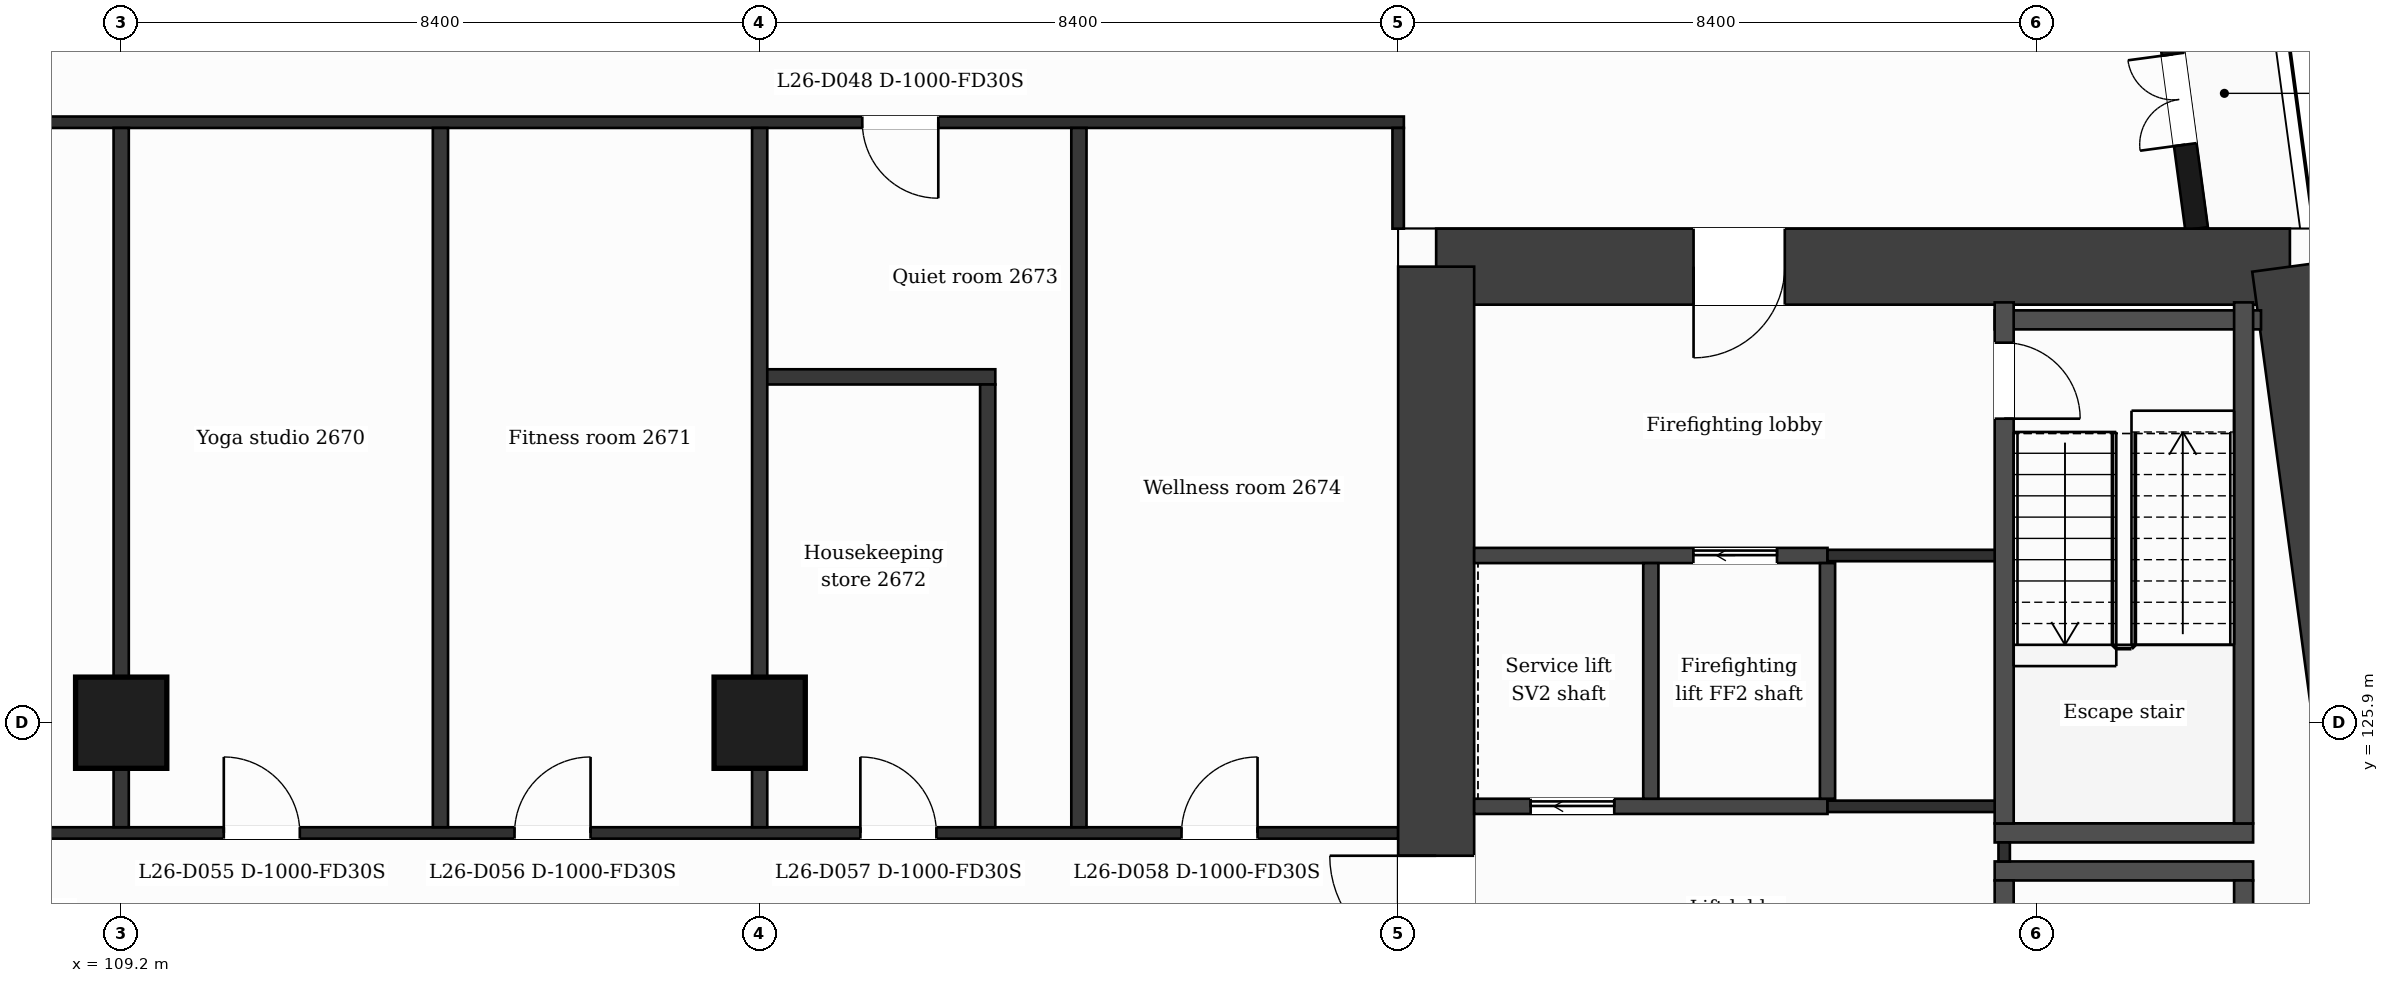
"""IFC4 building model, lengths in metres.
Left out: names, types, materials, properties, quantities, classifications, styles, units other than length and angle.
Written with IfcOpenShell. Run it as: python <this file> out.ifc"""

import sys

from ifc_helpers import new_model, si_unit, direction, frame, frame_2d, origin, origin_2d, place, context, subcontext, project, spatial, rectangle, extrude, element, fill, save


model = new_model("IFC4")
c1 = context("Model", 3, precision=1e-05, world=origin(), true_north=direction((0.0, 1.0)))
c2 = subcontext(c1, "Body", "Model", "MODEL_VIEW")
j1 = project(units=[si_unit("LENGTHUNIT", "METRE"), si_unit("PLANEANGLEUNIT", "RADIAN")], contexts=[c1])
p1 = place(None, origin())
s1 = spatial("IfcSite", under=j1, at=p1, CompositionType="ELEMENT")
p2 = place(p1, origin())
s2 = spatial("IfcBuilding", under=s1, at=p2, CompositionType="ELEMENT")
p3 = place(p2, frame((0.0, 0.0, 113.2)))
s3 = spatial("IfcBuildingStorey", under=s2, at=p3, CompositionType="ELEMENT", Elevation=113.2)
p4 = place(p3, frame((126.5, 131.9, 0.0), z_axis=(0.0, 0.0, 1.0), x_axis=(1.0, 0.0, 0.0)))
e1 = element("IfcWall", 1, at=p4, inside=s3, PredefinedType="SHEAR", context=c2, shape_type="SweptSolid", body=[
    extrude(rectangle(XDim=11.232, YDim=1.0, at=frame_2d((5.616, 0.0))), origin(), (0.0, 0.0, 1.0), 3.7),
])
p5 = place(p4, frame((3.386, 0.0, 0.0)))
e2 = element("IfcOpeningElement", 2, at=p5, cuts=e1, PredefinedType="OPENING", context=c2, shape_type="SweptSolid", body=[
    extrude(rectangle(XDim=1.2, YDim=2.1, at=frame_2d((0.6, 1.05))), frame((0.0, 0.51, 0.0), z_axis=(0.0, -1.0, 0.0), x_axis=(1.0, 0.0, 0.0)), (0.0, 0.0, 1.0), 1.02),
])
p6 = place(p3, frame((137.732, 131.9, 0.0), z_axis=(0.0, 0.0, 1.0), x_axis=(0.133411141623, -0.991060778808, 0.0)))
e3 = element("IfcWall", 3, at=p6, inside=s3, PredefinedType="SHEAR", context=c2, shape_type="SweptSolid", body=[
    extrude(rectangle(XDim=21.189, YDim=1.0, at=frame_2d((10.595, 0.0))), origin(), (0.0, 0.0, 1.0), 3.7),
])
p7 = place(p3, frame((126.5, 110.9, 0.0), z_axis=(0.0, 0.0, 1.0), x_axis=(0.0, 1.0, 0.0)))
e4 = element("IfcWall", 4, at=p7, inside=s3, PredefinedType="SHEAR", context=c2, shape_type="SweptSolid", body=[
    extrude(rectangle(XDim=21.0, YDim=1.0, at=frame_2d((10.5, 0.0))), origin(), (0.0, 0.0, 1.0), 3.7),
])
p8 = place(p7, frame((11.85, 0.0, 0.0)))
e5 = element("IfcOpeningElement", 5, at=p8, cuts=e4, PredefinedType="OPENING", context=c2, shape_type="SweptSolid", body=[
    extrude(rectangle(XDim=1.4, YDim=2.1, at=frame_2d((0.7, 1.05))), frame((0.0, 0.51, 0.0), z_axis=(0.0, -1.0, 0.0), x_axis=(1.0, 0.0, 0.0)), (0.0, 0.0, 1.0), 1.02),
])
for number, where, z_axis, x_axis in (
    (6, (109.2, 125.9, 0.0), (0.0, 0.0, 1.0), (1.0, 0.0, 0.0)),
    (7, (117.6, 125.9, 0.0), (0.0, 0.0, 1.0), (1.0, 0.0, 0.0)),
):
    element("IfcColumn", number, at=place(p3, frame(where, z_axis=z_axis, x_axis=x_axis)), inside=s3, PredefinedType="COLUMN", context=c2, shape_type="SweptSolid", body=[
        extrude(rectangle(XDim=1.2, YDim=1.2, at=origin_2d()), origin(), (0.0, 0.0, 1.0), 3.7),
    ])
p9 = place(p3, frame((136.504, 132.4, 0.0), z_axis=(0.0, 0.0, 1.0), x_axis=(-0.133399697462, 0.99106231929, 0.0)))
e8 = element("IfcWall", 8, at=p9, inside=s3, PredefinedType="SOLIDWALL", context=c2, shape_type="SweptSolid", body=[
    extrude(rectangle(XDim=6.74, YDim=0.3, at=frame_2d((3.37, 0.0))), origin(), (0.0, 0.0, 1.0), 3.38),
])
p10 = place(p9, frame((1.115, 0.0, 0.0)))
e9 = element("IfcOpeningElement", 9, at=p10, cuts=e8, PredefinedType="OPENING", context=c2, shape_type="SweptSolid", body=[
    extrude(rectangle(XDim=1.2, YDim=2.4, at=frame_2d((0.6, 1.2))), frame((0.0, 0.16, 0.0), z_axis=(0.0, -1.0, 0.0), x_axis=(1.0, 0.0, 0.0)), (0.0, 0.0, 1.0), 0.32),
])
p11 = place(p9, frame((3.835, 0.0, 0.9)))
e10 = element("IfcOpeningElement", 10, at=p11, cuts=e8, PredefinedType="OPENING", context=c2, shape_type="SweptSolid", body=[
    extrude(rectangle(XDim=2.4, YDim=2.1, at=frame_2d((1.2, 1.05))), frame((0.0, 0.16, 0.0), z_axis=(0.0, -1.0, 0.0), x_axis=(1.0, 0.0, 0.0)), (0.0, 0.0, 1.0), 0.32),
])
for number, where, z_axis, x_axis in (
    (11, (133.848, 123.95, 0.0), (0.0, 0.0, 1.0), (1.0, 0.0, 0.0)),
    (12, (133.848, 124.45, 0.0), (0.0, 0.0, 1.0), (1.0, 0.0, 0.0)),
):
    element("IfcWall", number, at=place(p3, frame(where, z_axis=z_axis, x_axis=x_axis)), inside=s3, PredefinedType="PARTITIONING", context=c2, shape_type="SweptSolid", body=[
        extrude(rectangle(XDim=3.4, YDim=0.25, at=frame_2d((1.7, 0.0))), origin(), (0.0, 0.0, 1.0), 3.38),
    ])
p12 = place(p3, frame((100.8, 124.45, 0.0), z_axis=(0.0, 0.0, 1.0), x_axis=(1.0, 0.0, 0.0)))
e13 = element("IfcWall", 13, at=p12, inside=s3, PredefinedType="PARTITIONING", context=c2, shape_type="SweptSolid", body=[
    extrude(rectangle(XDim=25.2, YDim=0.15, at=frame_2d((12.6, 0.0))), origin(), (0.0, 0.0, 1.0), 3.38),
])
p13 = place(p12, frame((3.7, 0.0, 0.0)))
e14 = element("IfcOpeningElement", 14, at=p13, cuts=e13, PredefinedType="OPENING", context=c2, shape_type="SweptSolid", body=[
    extrude(rectangle(XDim=1.0, YDim=2.1, at=frame_2d((0.5, 1.05))), frame((0.0, 0.085, 0.0), z_axis=(0.0, -1.0, 0.0), x_axis=(1.0, 0.0, 0.0)), (0.0, 0.0, 1.0), 0.17),
])
p14 = place(p12, frame((9.75, 0.0, 0.0)))
e15 = element("IfcOpeningElement", 15, at=p14, cuts=e13, PredefinedType="OPENING", context=c2, shape_type="SweptSolid", body=[
    extrude(rectangle(XDim=1.0, YDim=2.1, at=frame_2d((0.5, 1.05))), frame((0.0, 0.085, 0.0), z_axis=(0.0, -1.0, 0.0), x_axis=(1.0, 0.0, 0.0)), (0.0, 0.0, 1.0), 0.17),
])
p15 = place(p12, frame((13.575, 0.0, 0.0)))
e16 = element("IfcOpeningElement", 16, at=p15, cuts=e13, PredefinedType="OPENING", context=c2, shape_type="SweptSolid", body=[
    extrude(rectangle(XDim=1.0, YDim=2.1, at=frame_2d((0.5, 1.05))), frame((0.0, 0.085, 0.0), z_axis=(0.0, -1.0, 0.0), x_axis=(1.0, 0.0, 0.0)), (0.0, 0.0, 1.0), 0.17),
])
p16 = place(p12, frame((18.125, 0.0, 0.0)))
e17 = element("IfcOpeningElement", 17, at=p16, cuts=e13, PredefinedType="OPENING", context=c2, shape_type="SweptSolid", body=[
    extrude(rectangle(XDim=1.0, YDim=2.1, at=frame_2d((0.5, 1.05))), frame((0.0, 0.085, 0.0), z_axis=(0.0, -1.0, 0.0), x_axis=(1.0, 0.0, 0.0)), (0.0, 0.0, 1.0), 0.17),
])
p17 = place(p12, frame((22.35, 0.0, 0.0)))
e18 = element("IfcOpeningElement", 18, at=p17, cuts=e13, PredefinedType="OPENING", context=c2, shape_type="SweptSolid", body=[
    extrude(rectangle(XDim=1.0, YDim=2.1, at=frame_2d((0.5, 1.05))), frame((0.0, 0.085, 0.0), z_axis=(0.0, -1.0, 0.0), x_axis=(1.0, 0.0, 0.0)), (0.0, 0.0, 1.0), 0.17),
])
p18 = place(p3, frame((127.0, 124.8, 0.0), z_axis=(0.0, 0.0, 1.0), x_axis=(1.0, 0.0, 0.0)))
e19 = element("IfcWall", 19, at=p18, inside=s3, PredefinedType="PARTITIONING", context=c2, shape_type="SweptSolid", body=[
    extrude(rectangle(XDim=4.649, YDim=0.2, at=frame_2d((2.324, 0.0))), origin(), (0.0, 0.0, 1.0), 3.38),
])
p19 = place(p18, frame((0.743, 0.0, 0.0)))
e20 = element("IfcOpeningElement", 20, at=p19, cuts=e19, PredefinedType="OPENING", context=c2, shape_type="SweptSolid", body=[
    extrude(rectangle(XDim=1.1, YDim=2.1, at=frame_2d((0.55, 1.05))), frame((0.0, 0.11, 0.0), z_axis=(0.0, -1.0, 0.0), x_axis=(1.0, 0.0, 0.0)), (0.0, 0.0, 1.0), 0.22),
])
p20 = place(p3, frame((131.649, 124.8, 0.0), z_axis=(0.0, 0.0, 1.0), x_axis=(1.0, 0.0, 0.0)))
e21 = element("IfcWall", 21, at=p20, inside=s3, PredefinedType="PARTITIONING", context=c2, shape_type="SweptSolid", body=[
    extrude(rectangle(XDim=2.449, YDim=0.15, at=frame_2d((1.225, 0.0))), origin(), (0.0, 0.0, 1.0), 3.38),
])
p21 = place(p3, frame((127.0, 128.1, 0.0), z_axis=(0.0, 0.0, 1.0), x_axis=(1.0, 0.0, 0.0)))
e22 = element("IfcWall", 22, at=p21, inside=s3, PredefinedType="PARTITIONING", context=c2, shape_type="SweptSolid", body=[
    extrude(rectangle(XDim=4.649, YDim=0.2, at=frame_2d((2.324, 0.0))), origin(), (0.0, 0.0, 1.0), 3.38),
])
p22 = place(p21, frame((2.884, 0.0, 0.0)))
e23 = element("IfcOpeningElement", 23, at=p22, cuts=e22, PredefinedType="OPENING", context=c2, shape_type="SweptSolid", body=[
    extrude(rectangle(XDim=1.1, YDim=2.1, at=frame_2d((0.55, 1.05))), frame((0.0, 0.11, 0.0), z_axis=(0.0, -1.0, 0.0), x_axis=(1.0, 0.0, 0.0)), (0.0, 0.0, 1.0), 0.22),
])
p23 = place(p3, frame((131.649, 128.1, 0.0), z_axis=(0.0, 0.0, 1.0), x_axis=(1.0, 0.0, 0.0)))
e24 = element("IfcWall", 24, at=p23, inside=s3, PredefinedType="PARTITIONING", context=c2, shape_type="SweptSolid", body=[
    extrude(rectangle(XDim=2.324, YDim=0.15, at=frame_2d((1.162, 0.0))), origin(), (0.0, 0.0, 1.0), 3.38),
])
p24 = place(p3, frame((117.6, 130.45, 0.0), z_axis=(0.0, 0.0, 1.0), x_axis=(1.0, 0.0, 0.0)))
e25 = element("IfcWall", 25, at=p24, inside=s3, PredefinedType="PARTITIONING", context=c2, shape_type="SweptSolid", body=[
    extrude(rectangle(XDim=3.1, YDim=0.2, at=frame_2d((1.55, 0.0))), origin(), (0.0, 0.0, 1.0), 3.38),
])
p25 = place(p3, frame((133.848, 131.2, 0.0), z_axis=(0.0, 0.0, 1.0), x_axis=(1.0, 0.0, 0.0)))
e26 = element("IfcWall", 26, at=p25, inside=s3, PredefinedType="PARTITIONING", context=c2, shape_type="SweptSolid", body=[
    extrude(rectangle(XDim=3.504, YDim=0.25, at=frame_2d((1.752, 0.0))), origin(), (0.0, 0.0, 1.0), 3.38),
])
p26 = place(p3, frame((100.725, 133.8, 0.0), z_axis=(0.0, 0.0, 1.0), x_axis=(1.0, 0.0, 0.0)))
e27 = element("IfcWall", 27, at=p26, inside=s3, PredefinedType="PARTITIONING", context=c2, shape_type="SweptSolid", body=[
    extrude(rectangle(XDim=25.35, YDim=0.15, at=frame_2d((12.675, 0.0))), origin(), (0.0, 0.0, 1.0), 3.38),
])
p27 = place(p26, frame((18.225, 0.0, 0.0)))
e28 = element("IfcOpeningElement", 28, at=p27, cuts=e27, PredefinedType="OPENING", context=c2, shape_type="SweptSolid", body=[
    extrude(rectangle(XDim=1.0, YDim=2.1, at=frame_2d((0.5, 1.05))), frame((0.0, 0.085, 0.0), z_axis=(0.0, -1.0, 0.0), x_axis=(1.0, 0.0, 0.0)), (0.0, 0.0, 1.0), 0.17),
])
for number, where, z_axis, x_axis in (
    (29, (109.2, 124.525, 0.0), (0.0, 0.0, 1.0), (0.0, 1.0, 0.0)),
    (30, (113.4, 124.525, 0.0), (0.0, 0.0, 1.0), (0.0, 1.0, 0.0)),
    (31, (117.6, 124.525, 0.0), (0.0, 0.0, 1.0), (0.0, 1.0, 0.0)),
):
    element("IfcWall", number, at=place(p3, frame(where, z_axis=z_axis, x_axis=x_axis)), inside=s3, PredefinedType="PARTITIONING", context=c2, shape_type="SweptSolid", body=[
        extrude(rectangle(XDim=9.2, YDim=0.2, at=frame_2d((4.6, 0.0))), origin(), (0.0, 0.0, 1.0), 3.38),
    ])
p28 = place(p3, frame((120.6, 124.525, 0.0), z_axis=(0.0, 0.0, 1.0), x_axis=(0.0, 1.0, 0.0)))
e32 = element("IfcWall", 32, at=p28, inside=s3, PredefinedType="PARTITIONING", context=c2, shape_type="SweptSolid", body=[
    extrude(rectangle(XDim=5.825, YDim=0.2, at=frame_2d((2.913, 0.0))), origin(), (0.0, 0.0, 1.0), 3.38),
])
p29 = place(p3, frame((121.8, 124.525, 0.0), z_axis=(0.0, 0.0, 1.0), x_axis=(0.0, 1.0, 0.0)))
e33 = element("IfcWall", 33, at=p29, inside=s3, PredefinedType="PARTITIONING", context=c2, shape_type="SweptSolid", body=[
    extrude(rectangle(XDim=9.2, YDim=0.2, at=frame_2d((4.6, 0.0))), origin(), (0.0, 0.0, 1.0), 3.38),
])
p30 = place(p3, frame((126.0, 132.4, 0.0), z_axis=(0.0, 0.0, 1.0), x_axis=(0.0, 1.0, 0.0)))
e34 = element("IfcWall", 34, at=p30, inside=s3, PredefinedType="PARTITIONING", context=c2, shape_type="SweptSolid", body=[
    extrude(rectangle(XDim=1.325, YDim=0.15, at=frame_2d((0.663, 0.0))), origin(), (0.0, 0.0, 1.0), 3.38),
])
for number, where, z_axis, x_axis in (
    (35, (129.324, 124.9, 0.0), (0.0, 0.0, 1.0), (0.0, 1.0, 0.0)),
    (36, (131.649, 124.9, 0.0), (0.0, 0.0, 1.0), (0.0, 1.0, 0.0)),
):
    element("IfcWall", number, at=place(p3, frame(where, z_axis=z_axis, x_axis=x_axis)), inside=s3, PredefinedType="PARTITIONING", context=c2, shape_type="SweptSolid", body=[
        extrude(rectangle(XDim=3.1, YDim=0.2, at=frame_2d((1.55, 0.0))), origin(), (0.0, 0.0, 1.0), 3.38),
    ])
p31 = place(p3, frame((133.973, 124.075, 0.0), z_axis=(0.0, 0.0, 1.0), x_axis=(0.0, 1.0, 0.0)))
e37 = element("IfcWall", 37, at=p31, inside=s3, PredefinedType="PARTITIONING", context=c2, shape_type="SweptSolid", body=[
    extrude(rectangle(XDim=0.25, YDim=0.15, at=frame_2d((0.125, 0.0))), origin(), (0.0, 0.0, 1.0), 3.38),
])
p32 = place(p3, frame((133.973, 116.97, 0.0), z_axis=(0.0, 0.0, 1.0), x_axis=(0.0, 1.0, 0.0)))
e38 = element("IfcWall", 38, at=p32, inside=s3, PredefinedType="PARTITIONING", context=c2, shape_type="SweptSolid", body=[
    extrude(rectangle(XDim=6.855, YDim=0.25, at=frame_2d((3.427, 0.0))), origin(), (0.0, 0.0, 1.0), 3.38),
])
p33 = place(p32, frame((5.555, 0.0, 0.0)))
e39 = element("IfcOpeningElement", 39, at=p33, cuts=e38, PredefinedType="OPENING", context=c2, shape_type="SweptSolid", body=[
    extrude(rectangle(XDim=0.95, YDim=2.1, at=frame_2d((0.475, 1.05))), frame((0.0, 0.135, 0.0), z_axis=(0.0, -1.0, 0.0), x_axis=(1.0, 0.0, 0.0)), (0.0, 0.0, 1.0), 0.27),
])
p34 = place(p3, frame((133.973, 124.575, 0.0), z_axis=(0.0, 0.0, 1.0), x_axis=(0.0, 1.0, 0.0)))
e40 = element("IfcWall", 40, at=p34, inside=s3, PredefinedType="PARTITIONING", context=c2, shape_type="SweptSolid", body=[
    extrude(rectangle(XDim=6.855, YDim=0.25, at=frame_2d((3.427, 0.0))), origin(), (0.0, 0.0, 1.0), 3.38),
])
p35 = place(p34, frame((5.325, 0.0, 0.0)))
e41 = element("IfcOpeningElement", 41, at=p35, cuts=e40, PredefinedType="OPENING", context=c2, shape_type="SweptSolid", body=[
    extrude(rectangle(XDim=1.0, YDim=2.1, at=frame_2d((0.5, 1.05))), frame((0.0, 0.135, 0.0), z_axis=(0.0, -1.0, 0.0), x_axis=(1.0, 0.0, 0.0)), (0.0, 0.0, 1.0), 0.27),
])
for number, where, z_axis, x_axis in (
    (42, (137.123, 116.97, 0.0), (0.0, 0.0, 1.0), (0.0, 1.0, 0.0)),
    (43, (137.123, 124.575, 0.0), (0.0, 0.0, 1.0), (0.0, 1.0, 0.0)),
):
    element("IfcWall", number, at=place(p3, frame(where, z_axis=z_axis, x_axis=x_axis)), inside=s3, PredefinedType="PARTITIONING", context=c2, shape_type="SweptSolid", body=[
        extrude(rectangle(XDim=6.855, YDim=0.25, at=frame_2d((3.427, 0.0))), origin(), (0.0, 0.0, 1.0), 3.38),
    ])
p36 = place(p10, origin())
e44 = element("IfcDoor", 44, at=p36, inside=s3, OperationType="DOUBLE_DOOR_SINGLE_SWING", PredefinedType="DOOR", context=c2, shape_type="SweptSolid", body=[
    extrude(rectangle(XDim=1.2, YDim=2.4, at=frame_2d((0.6, 1.2))), frame((0.0, 0.025, 0.0), z_axis=(0.0, -1.0, 0.0), x_axis=(1.0, 0.0, 0.0)), (0.0, 0.0, 1.0), 0.05),
])
fill(e9, e44)
p37 = place(p22, origin())
e45 = element("IfcDoor", 45, at=p37, inside=s3, OperationType="SLIDING_TO_LEFT", PredefinedType="DOOR", context=c2, shape_type="SweptSolid", body=[
    extrude(rectangle(XDim=1.1, YDim=2.1, at=frame_2d((0.55, 1.05))), frame((0.0, 0.025, 0.0), z_axis=(0.0, -1.0, 0.0), x_axis=(1.0, 0.0, 0.0)), (0.0, 0.0, 1.0), 0.05),
])
fill(e23, e45)
p38 = place(p19, origin())
e46 = element("IfcDoor", 46, at=p38, inside=s3, OperationType="SLIDING_TO_LEFT", PredefinedType="DOOR", context=c2, shape_type="SweptSolid", body=[
    extrude(rectangle(XDim=1.1, YDim=2.1, at=frame_2d((0.55, 1.05))), frame((0.0, 0.025, 0.0), z_axis=(0.0, -1.0, 0.0), x_axis=(1.0, 0.0, 0.0)), (0.0, 0.0, 1.0), 0.05),
])
fill(e20, e46)
p39 = place(p35, origin())
e47 = element("IfcDoor", 47, at=p39, inside=s3, OperationType="SINGLE_SWING_LEFT", PredefinedType="DOOR", context=c2, shape_type="SweptSolid", body=[
    extrude(rectangle(XDim=1.0, YDim=2.1, at=frame_2d((0.5, 1.05))), frame((0.0, 0.025, 0.0), z_axis=(0.0, -1.0, 0.0), x_axis=(1.0, 0.0, 0.0)), (0.0, 0.0, 1.0), 0.05),
])
fill(e41, e47)
p40 = place(p27, origin())
e48 = element("IfcDoor", 48, at=p40, inside=s3, OperationType="SINGLE_SWING_RIGHT", PredefinedType="DOOR", context=c2, shape_type="SweptSolid", body=[
    extrude(rectangle(XDim=1.0, YDim=2.1, at=frame_2d((0.5, 1.05))), frame((0.0, 0.025, 0.0), z_axis=(0.0, -1.0, 0.0), x_axis=(1.0, 0.0, 0.0)), (0.0, 0.0, 1.0), 0.05),
])
fill(e28, e48)
p41 = place(p14, origin())
e49 = element("IfcDoor", 49, at=p41, inside=s3, OperationType="SINGLE_SWING_LEFT", PredefinedType="DOOR", context=c2, shape_type="SweptSolid", body=[
    extrude(rectangle(XDim=1.0, YDim=2.1, at=frame_2d((0.5, 1.05))), frame((0.0, 0.025, 0.0), z_axis=(0.0, -1.0, 0.0), x_axis=(1.0, 0.0, 0.0)), (0.0, 0.0, 1.0), 0.05),
])
fill(e15, e49)
p42 = place(p15, origin())
e50 = element("IfcDoor", 50, at=p42, inside=s3, OperationType="SINGLE_SWING_RIGHT", PredefinedType="DOOR", context=c2, shape_type="SweptSolid", body=[
    extrude(rectangle(XDim=1.0, YDim=2.1, at=frame_2d((0.5, 1.05))), frame((0.0, 0.025, 0.0), z_axis=(0.0, -1.0, 0.0), x_axis=(1.0, 0.0, 0.0)), (0.0, 0.0, 1.0), 0.05),
])
fill(e16, e50)
p43 = place(p16, origin())
e51 = element("IfcDoor", 51, at=p43, inside=s3, OperationType="SINGLE_SWING_LEFT", PredefinedType="DOOR", context=c2, shape_type="SweptSolid", body=[
    extrude(rectangle(XDim=1.0, YDim=2.1, at=frame_2d((0.5, 1.05))), frame((0.0, 0.025, 0.0), z_axis=(0.0, -1.0, 0.0), x_axis=(1.0, 0.0, 0.0)), (0.0, 0.0, 1.0), 0.05),
])
fill(e17, e51)
p44 = place(p17, origin())
e52 = element("IfcDoor", 52, at=p44, inside=s3, OperationType="SINGLE_SWING_RIGHT", PredefinedType="DOOR", context=c2, shape_type="SweptSolid", body=[
    extrude(rectangle(XDim=1.0, YDim=2.1, at=frame_2d((0.5, 1.05))), frame((0.0, 0.025, 0.0), z_axis=(0.0, -1.0, 0.0), x_axis=(1.0, 0.0, 0.0)), (0.0, 0.0, 1.0), 0.05),
])
fill(e18, e52)
p45 = place(p5, origin())
e53 = element("IfcDoor", 53, at=p45, inside=s3, OperationType="SINGLE_SWING_LEFT", PredefinedType="DOOR", context=c2, shape_type="SweptSolid", body=[
    extrude(rectangle(XDim=1.2, YDim=2.1, at=frame_2d((0.6, 1.05))), frame((0.0, 0.025, 0.0), z_axis=(0.0, -1.0, 0.0), x_axis=(1.0, 0.0, 0.0)), (0.0, 0.0, 1.0), 0.05),
])
fill(e2, e53)
p46 = place(p8, origin())
e54 = element("IfcDoor", 54, at=p46, inside=s3, OperationType="SINGLE_SWING_RIGHT", PredefinedType="DOOR", context=c2, shape_type="SweptSolid", body=[
    extrude(rectangle(XDim=1.4, YDim=2.1, at=frame_2d((0.7, 1.05))), frame((0.0, 0.025, 0.0), z_axis=(0.0, -1.0, 0.0), x_axis=(1.0, 0.0, 0.0)), (0.0, 0.0, 1.0), 0.05),
])
fill(e5, e54)
save(model, sys.argv[1])
